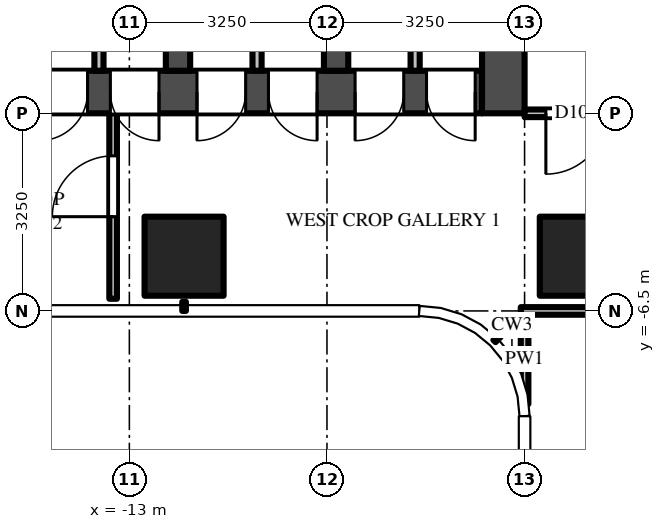
"""IFC4 building model, lengths in metres.
Left out: names, types, materials, properties, quantities, classifications, styles, units other than length and angle.
Written with IfcOpenShell. Run it as: python <this file> out.ifc"""

import sys

from ifc_helpers import new_model, si_unit, direction, frame, frame_2d, origin, origin_2d, place, context, subcontext, project, spatial, rectangle, extrude, source, transform, mapped, element, fill, save


model = new_model("IFC4")
c1 = context("Model", 3, precision=1e-05, world=origin(), true_north=direction((0.0, 1.0)))
c2 = subcontext(c1, "Body", "Model", "MODEL_VIEW")
j1 = project(units=[si_unit("LENGTHUNIT", "METRE"), si_unit("PLANEANGLEUNIT", "RADIAN")], contexts=[c1])
p1 = place(None, origin())
s1 = spatial("IfcSite", under=j1, at=p1, CompositionType="ELEMENT")
p2 = place(p1, origin())
s2 = spatial("IfcBuilding", under=s1, at=p2, CompositionType="ELEMENT")
p3 = place(p2, frame((0.0, 0.0, 138.0)))
s3 = spatial("IfcBuildingStorey", under=s2, at=p3, CompositionType="ELEMENT", Elevation=138.0)
m1 = source(origin(), c2, "Body", "SweptSolid", [
    extrude(rectangle(XDim=1.3, YDim=1.3, at=origin_2d()), origin(), (0.0, 0.0, 1.0), 4.5),
])
for number, where, z_axis, x_axis in (
    (1, (-5.6, -5.6, 0.0), (0.0, 0.0, 1.0), (1.0, 0.0, 0.0)),
    (2, (-12.1, -5.6, 0.0), (0.0, 0.0, 1.0), (1.0, 0.0, 0.0)),
):
    element("IfcColumn", number, at=place(p3, frame(where, z_axis=z_axis, x_axis=x_axis)), inside=s3, PredefinedType="COLUMN", context=c2, shape_type="MappedRepresentation", body=[
        mapped(m1, transform((0.0, 0.0, 0.0))),
    ])
m2 = source(origin(), c2, "Body", "SweptSolid", [
    extrude(rectangle(XDim=14.85, YDim=0.7, at=frame_2d((7.425, 0.0))), origin(), (0.0, 0.0, 1.0), 4.25),
])
p4 = place(p3, frame((-7.2, -2.9, 0.0), z_axis=(0.0, 0.0, 1.0), x_axis=(-1.0, 0.0, 0.0)))
e3 = element("IfcWall", 3, at=p4, inside=s3, PredefinedType="SHEAR", context=c2, shape_type="MappedRepresentation", body=[
    mapped(m2, transform((0.0, 0.0, 0.0))),
])
m3 = source(origin(), c2, "Body", "SweptSolid", [
    extrude(rectangle(XDim=1.3, YDim=2.1, at=frame_2d((0.65, 1.05))), frame((0.0, 0.36, 0.0), z_axis=(0.0, -1.0, 0.0), x_axis=(1.0, 0.0, 0.0)), (0.0, 0.0, 1.0), 0.72),
])
p5 = place(p4, frame((12.2, 0.0, 0.0)))
e4 = element("IfcOpeningElement", 4, at=p5, cuts=e3, PredefinedType="OPENING", context=c2, shape_type="MappedRepresentation", body=[
    mapped(m3, transform((0.0, 0.0, 0.0))),
])
m4 = source(origin(), c2, "Body", "SweptSolid", [
    extrude(rectangle(XDim=1.2, YDim=2.1, at=frame_2d((0.6, 1.05))), frame((0.0, 0.36, 0.0), z_axis=(0.0, -1.0, 0.0), x_axis=(1.0, 0.0, 0.0)), (0.0, 0.0, 1.0), 0.72),
])
p6 = place(p4, frame((9.85, 0.0, 0.0)))
e5 = element("IfcOpeningElement", 5, at=p6, cuts=e3, PredefinedType="OPENING", context=c2, shape_type="MappedRepresentation", body=[
    mapped(m4, transform((0.0, 0.0, 0.0))),
])
m5 = source(origin(), c2, "Body", "SweptSolid", [
    extrude(rectangle(XDim=1.0, YDim=2.1, at=frame_2d((0.5, 1.05))), frame((0.0, 0.36, 0.0), z_axis=(0.0, -1.0, 0.0), x_axis=(1.0, 0.0, 0.0)), (0.0, 0.0, 1.0), 0.72),
])
p7 = place(p4, frame((7.9, 0.0, 0.0)))
e6 = element("IfcOpeningElement", 6, at=p7, cuts=e3, PredefinedType="OPENING", context=c2, shape_type="MappedRepresentation", body=[
    mapped(m5, transform((0.0, 0.0, 0.0))),
])
m6 = source(origin(), c2, "Body", "SweptSolid", [
    extrude(rectangle(XDim=0.8, YDim=2.1, at=frame_2d((0.4, 1.05))), frame((0.0, 0.36, 0.0), z_axis=(0.0, -1.0, 0.0), x_axis=(1.0, 0.0, 0.0)), (0.0, 0.0, 1.0), 0.72),
])
p8 = place(p4, frame((0.113, 0.0, 0.0)))
e7 = element("IfcOpeningElement", 7, at=p8, cuts=e3, PredefinedType="OPENING", context=c2, shape_type="MappedRepresentation", body=[
    mapped(m6, transform((0.0, 0.0, 0.0))),
])
p9 = place(p4, frame((1.288, 0.0, 0.0)))
e8 = element("IfcOpeningElement", 8, at=p9, cuts=e3, PredefinedType="OPENING", context=c2, shape_type="MappedRepresentation", body=[
    mapped(m6, transform((0.0, 0.0, 0.0))),
])
p10 = place(p4, frame((2.712, 0.0, 0.0)))
e9 = element("IfcOpeningElement", 9, at=p10, cuts=e3, PredefinedType="OPENING", context=c2, shape_type="MappedRepresentation", body=[
    mapped(m6, transform((0.0, 0.0, 0.0))),
])
p11 = place(p4, frame((3.887, 0.0, 0.0)))
e10 = element("IfcOpeningElement", 10, at=p11, cuts=e3, PredefinedType="OPENING", context=c2, shape_type="MappedRepresentation", body=[
    mapped(m6, transform((0.0, 0.0, 0.0))),
])
p12 = place(p4, frame((5.312, 0.0, 0.0)))
e11 = element("IfcOpeningElement", 11, at=p12, cuts=e3, PredefinedType="OPENING", context=c2, shape_type="MappedRepresentation", body=[
    mapped(m6, transform((0.0, 0.0, 0.0))),
])
p13 = place(p4, frame((6.488, 0.0, 0.0)))
e12 = element("IfcOpeningElement", 12, at=p13, cuts=e3, PredefinedType="OPENING", context=c2, shape_type="MappedRepresentation", body=[
    mapped(m6, transform((0.0, 0.0, 0.0))),
])
m7 = source(origin(), c2, "Body", "SweptSolid", [
    extrude(rectangle(XDim=9.05, YDim=0.7, at=frame_2d((4.525, 0.0))), origin(), (0.0, 0.0, 1.0), 4.25),
])
p14 = place(p3, frame((-6.85, 5.8, 0.0), z_axis=(0.0, 0.0, 1.0), x_axis=(0.0, -1.0, 0.0)))
e13 = element("IfcWall", 13, at=p14, inside=s3, PredefinedType="SHEAR", context=c2, shape_type="MappedRepresentation", body=[
    mapped(m7, transform((0.0, 0.0, 0.0))),
])
m8 = source(origin(), c2, "Body", "SweptSolid", [
    extrude(rectangle(XDim=1.8, YDim=2.1, at=frame_2d((0.9, 1.05))), frame((0.0, 0.36, 0.0), z_axis=(0.0, -1.0, 0.0), x_axis=(1.0, 0.0, 0.0)), (0.0, 0.0, 1.0), 0.72),
])
p15 = place(p14, frame((3.15, 0.0, 0.0)))
e14 = element("IfcOpeningElement", 14, at=p15, cuts=e13, PredefinedType="OPENING", context=c2, shape_type="MappedRepresentation", body=[
    mapped(m8, transform((0.0, 0.0, 0.0))),
])
m9 = source(origin(), c2, "Body", "SweptSolid", [
    extrude(rectangle(XDim=2.45, YDim=0.4, at=frame_2d((1.225, 0.0))), origin(), (0.0, 0.0, 1.0), 4.25),
])
for number, where, z_axis, x_axis in (
    (15, (-9.6, -0.1, 0.0), (0.0, 0.0, 1.0), (0.0, -1.0, 0.0)),
    (16, (-12.2, -0.1, 0.0), (0.0, 0.0, 1.0), (0.0, -1.0, 0.0)),
):
    element("IfcWall", number, at=place(p3, frame(where, z_axis=z_axis, x_axis=x_axis)), inside=s3, PredefinedType="SHEAR", context=c2, shape_type="MappedRepresentation", body=[
        mapped(m9, transform((0.0, 0.0, 0.0))),
    ])
m10 = source(origin(), c2, "Body", "SweptSolid", [
    extrude(rectangle(XDim=2.45, YDim=0.15, at=frame_2d((1.225, 0.0))), origin(), (0.0, 0.0, 1.0), 4.25),
])
for number, where, z_axis, x_axis in (
    (17, (-8.3, -0.1, 0.0), (0.0, 0.0, 1.0), (0.0, -1.0, 0.0)),
    (18, (-10.9, -0.1, 0.0), (0.0, 0.0, 1.0), (0.0, -1.0, 0.0)),
    (19, (-13.5, -0.1, 0.0), (0.0, 0.0, 1.0), (0.0, -1.0, 0.0)),
):
    element("IfcWall", number, at=place(p3, frame(where, z_axis=z_axis, x_axis=x_axis)), inside=s3, PredefinedType="PARTITIONING", context=c2, shape_type="MappedRepresentation", body=[
        mapped(m10, transform((0.0, 0.0, 0.0))),
    ])
m11 = source(origin(), c2, "Body", "SweptSolid", [
    extrude(rectangle(XDim=3.05, YDim=0.125, at=frame_2d((1.525, 0.0))), origin(), (0.0, 0.0, 1.0), 3.33),
])
p16 = place(p3, frame((-13.267, -6.3, 0.0), z_axis=(0.0, 0.0, 1.0), x_axis=(0.0, 1.0, 0.0)))
e20 = element("IfcWall", 20, at=p16, inside=s3, PredefinedType="PARTITIONING", context=c2, shape_type="MappedRepresentation", body=[
    mapped(m11, transform((0.0, 0.0, 0.0))),
])
m12 = source(origin(), c2, "Body", "SweptSolid", [
    extrude(rectangle(XDim=1.0, YDim=2.1, at=frame_2d((0.5, 1.05))), frame((0.0, 0.073, 0.0), z_axis=(0.0, -1.0, 0.0), x_axis=(1.0, 0.0, 0.0)), (0.0, 0.0, 1.0), 0.145),
])
p17 = place(p16, frame((1.35, 0.0, 0.0)))
e21 = element("IfcOpeningElement", 21, at=p17, cuts=e20, PredefinedType="OPENING", context=c2, shape_type="MappedRepresentation", body=[
    mapped(m12, transform((0.0, 0.0, 0.0))),
])
m13 = source(origin(), c2, "Body", "SweptSolid", [
    extrude(rectangle(XDim=1.469, YDim=0.125, at=frame_2d((0.734, 0.0))), origin(), (0.0, 0.0, 1.0), 4.25),
])
p18 = place(p3, frame((-6.5, -6.562, 0.0), z_axis=(0.0, 0.0, 1.0), x_axis=(0.0, -1.0, 0.0)))
e22 = element("IfcWall", 22, at=p18, inside=s3, PredefinedType="PARTITIONING", context=c2, shape_type="MappedRepresentation", body=[
    mapped(m13, transform((0.0, 0.0, 0.0))),
])
m14 = source(origin(), c2, "Body", "SweptSolid", [
    extrude(rectangle(XDim=5.425, YDim=0.125, at=frame_2d((2.712, 0.0))), origin(), (0.0, 0.0, 1.0), 3.33),
])
p19 = place(p3, frame((-1.137, -6.5, 0.0), z_axis=(0.0, 0.0, 1.0), x_axis=(-1.0, 0.0, 0.0)))
e23 = element("IfcWall", 23, at=p19, inside=s3, PredefinedType="PARTITIONING", context=c2, shape_type="MappedRepresentation", body=[
    mapped(m14, transform((0.0, 0.0, 0.0))),
])
m15 = source(origin(), c2, "Body", "SweptSolid", [
    extrude(rectangle(XDim=5.363, YDim=0.125, at=frame_2d((2.681, 0.0))), origin(), (0.0, 0.0, 1.0), 3.468),
])
p20 = place(p3, frame((-1.137, -3.25, 0.0), z_axis=(0.0, 0.0, 1.0), x_axis=(-1.0, 0.0, 0.0)))
e24 = element("IfcWall", 24, at=p20, inside=s3, PredefinedType="PARTITIONING", context=c2, shape_type="MappedRepresentation", body=[
    mapped(m15, transform((0.0, 0.0, 0.0))),
])
p21 = place(p20, frame((4.012, 0.0, 0.0)))
e25 = element("IfcOpeningElement", 25, at=p21, cuts=e24, PredefinedType="OPENING", context=c2, shape_type="MappedRepresentation", body=[
    mapped(m12, transform((0.0, 0.0, 0.0))),
])
m16 = source(origin(), c2, "Body", "SweptSolid", [
    extrude(rectangle(XDim=0.8, YDim=2.1, at=frame_2d((0.4, 1.05))), frame((0.0, -0.275, 0.0), z_axis=(0.0, -1.0, 0.0), x_axis=(1.0, 0.0, 0.0)), (0.0, 0.0, 1.0), 0.05),
])
p22 = place(p8, origin())
e26 = element("IfcDoor", 26, at=p22, inside=s3, OperationType="SINGLE_SWING_LEFT", PredefinedType="DOOR", context=c2, shape_type="MappedRepresentation", body=[
    mapped(m16, transform((0.0, 0.0, 0.0))),
])
fill(e7, e26)
p23 = place(p9, origin())
e27 = element("IfcDoor", 27, at=p23, inside=s3, OperationType="SINGLE_SWING_RIGHT", PredefinedType="DOOR", context=c2, shape_type="MappedRepresentation", body=[
    mapped(m16, transform((0.0, 0.0, 0.0))),
])
fill(e8, e27)
p24 = place(p10, origin())
e28 = element("IfcDoor", 28, at=p24, inside=s3, OperationType="SINGLE_SWING_LEFT", PredefinedType="DOOR", context=c2, shape_type="MappedRepresentation", body=[
    mapped(m16, transform((0.0, 0.0, 0.0))),
])
fill(e9, e28)
p25 = place(p11, origin())
e29 = element("IfcDoor", 29, at=p25, inside=s3, OperationType="SINGLE_SWING_RIGHT", PredefinedType="DOOR", context=c2, shape_type="MappedRepresentation", body=[
    mapped(m16, transform((0.0, 0.0, 0.0))),
])
fill(e10, e29)
p26 = place(p12, origin())
e30 = element("IfcDoor", 30, at=p26, inside=s3, OperationType="SINGLE_SWING_LEFT", PredefinedType="DOOR", context=c2, shape_type="MappedRepresentation", body=[
    mapped(m16, transform((0.0, 0.0, 0.0))),
])
fill(e11, e30)
p27 = place(p13, origin())
e31 = element("IfcDoor", 31, at=p27, inside=s3, OperationType="SINGLE_SWING_RIGHT", PredefinedType="DOOR", context=c2, shape_type="MappedRepresentation", body=[
    mapped(m16, transform((0.0, 0.0, 0.0))),
])
fill(e12, e31)
m17 = source(origin(), c2, "Body", "SweptSolid", [
    extrude(rectangle(XDim=1.0, YDim=2.1, at=frame_2d((0.5, 1.05))), frame((0.0, 0.025, 0.0), z_axis=(0.0, -1.0, 0.0), x_axis=(1.0, 0.0, 0.0)), (0.0, 0.0, 1.0), 0.05),
])
p28 = place(p17, origin())
e32 = element("IfcDoor", 32, at=p28, inside=s3, OperationType="SINGLE_SWING_LEFT", PredefinedType="DOOR", context=c2, shape_type="MappedRepresentation", body=[
    mapped(m17, transform((0.0, 0.0, 0.0))),
])
fill(e21, e32)
p29 = place(p21, origin())
e33 = element("IfcDoor", 33, at=p29, inside=s3, OperationType="SINGLE_SWING_RIGHT", PredefinedType="DOOR", context=c2, shape_type="MappedRepresentation", body=[
    mapped(m17, transform((0.0, 0.0, 0.0))),
])
fill(e25, e33)
save(model, sys.argv[1])
